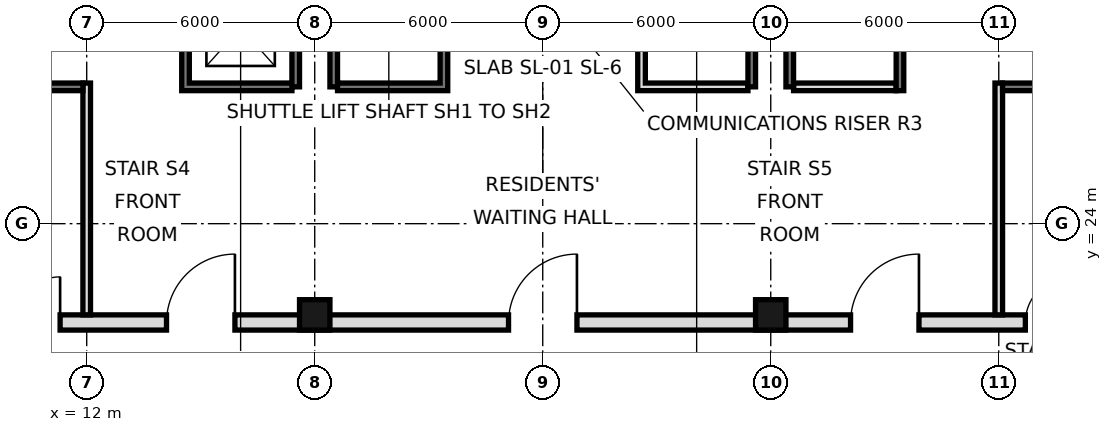
"""IFC4 building model, lengths in metres.
Left out: names, types, materials, properties, quantities, classifications, styles, units other than length and angle.
Written with IfcOpenShell. Run it as: python <this file> out.ifc"""

import sys

from ifc_helpers import new_model, si_unit, direction, frame, frame_2d, origin, origin_2d, place, context, subcontext, project, spatial, rectangle, hollow_rectangle, extrude, element, fill, save


model = new_model("IFC4")
c1 = context("Model", 3, precision=1e-05, world=origin(), true_north=direction((0.0, 1.0)))
c2 = subcontext(c1, "Body", "Model", "MODEL_VIEW")
j1 = project(units=[si_unit("LENGTHUNIT", "METRE"), si_unit("PLANEANGLEUNIT", "RADIAN")], contexts=[c1])
p1 = place(None, origin())
s1 = spatial("IfcSite", under=j1, at=p1, CompositionType="ELEMENT")
p2 = place(p1, origin())
s2 = spatial("IfcBuilding", under=s1, at=p2, CompositionType="ELEMENT")
p3 = place(p2, frame((0.0, 0.0, 44.4)))
s3 = spatial("IfcBuildingStorey", under=s2, at=p3, CompositionType="ELEMENT", Elevation=44.4)
for number, where, z_axis, x_axis in (
    (1, (18.0, 21.6, 0.0), (0.0, 0.0, 1.0), (1.0, 0.0, 0.0)),
    (2, (30.0, 21.6, 0.0), (0.0, 0.0, 1.0), (1.0, 0.0, 0.0)),
):
    element("IfcColumn", number, at=place(p3, frame(where, z_axis=z_axis, x_axis=x_axis)), inside=s3, PredefinedType="COLUMN", context=c2, shape_type="SweptSolid", body=[
        extrude(hollow_rectangle(XDim=0.8, YDim=0.8, WallThickness=0.07, at=origin_2d()), origin(), (0.0, 0.0, 1.0), 5.4),
    ])
for number, where, z_axis, x_axis in (
    (3, (17.5, 27.6, 0.0), (0.0, 0.0, 1.0), (0.0, 1.0, 0.0)),
    (4, (18.5, 27.6, 0.0), (0.0, 0.0, 1.0), (0.0, 1.0, 0.0)),
    (5, (29.5, 27.6, 0.0), (0.0, 0.0, 1.0), (0.0, 1.0, 0.0)),
    (6, (30.5, 27.6, 0.0), (0.0, 0.0, 1.0), (0.0, 1.0, 0.0)),
):
    element("IfcWall", number, at=place(p3, frame(where, z_axis=z_axis, x_axis=x_axis)), inside=s3, PredefinedType="SOLIDWALL", context=c2, shape_type="SweptSolid", body=[
        extrude(rectangle(XDim=17.5, YDim=0.2, at=frame_2d((8.75, 0.0))), origin(), (0.0, 0.0, 1.0), 5.22),
    ])
p4 = place(p3, frame((5.6, 21.4, 0.0), z_axis=(0.0, 0.0, 1.0), x_axis=(1.0, 0.0, 0.0)))
e7 = element("IfcWall", 7, at=p4, inside=s3, PredefinedType="SOLIDWALL", context=c2, shape_type="SweptSolid", body=[
    extrude(rectangle(XDim=36.8, YDim=0.4, at=frame_2d((18.4, 0.0))), origin(), (0.0, 0.0, 1.0), 5.22),
])
p5 = place(p4, frame((8.5, 0.0, 0.0)))
e8 = element("IfcOpeningElement", 8, at=p5, cuts=e7, PredefinedType="OPENING", context=c2, shape_type="SweptSolid", body=[
    extrude(rectangle(XDim=1.8, YDim=2.1, at=frame_2d((0.9, 1.05))), frame((0.0, 0.21, 0.0), z_axis=(0.0, -1.0, 0.0), x_axis=(1.0, 0.0, 0.0)), (0.0, 0.0, 1.0), 0.42),
])
p6 = place(p4, frame((17.5, 0.0, 0.0)))
e9 = element("IfcOpeningElement", 9, at=p6, cuts=e7, PredefinedType="OPENING", context=c2, shape_type="SweptSolid", body=[
    extrude(rectangle(XDim=1.8, YDim=2.1, at=frame_2d((0.9, 1.05))), frame((0.0, 0.21, 0.0), z_axis=(0.0, -1.0, 0.0), x_axis=(1.0, 0.0, 0.0)), (0.0, 0.0, 1.0), 0.42),
])
p7 = place(p4, frame((26.5, 0.0, 0.0)))
e10 = element("IfcOpeningElement", 10, at=p7, cuts=e7, PredefinedType="OPENING", context=c2, shape_type="SweptSolid", body=[
    extrude(rectangle(XDim=1.8, YDim=2.1, at=frame_2d((0.9, 1.05))), frame((0.0, 0.21, 0.0), z_axis=(0.0, -1.0, 0.0), x_axis=(1.0, 0.0, 0.0)), (0.0, 0.0, 1.0), 0.42),
])
p8 = place(p4, frame((4.5, 0.0, 0.0)))
e11 = element("IfcOpeningElement", 11, at=p8, cuts=e7, PredefinedType="OPENING", context=c2, shape_type="SweptSolid", body=[
    extrude(rectangle(XDim=1.2, YDim=2.1, at=frame_2d((0.6, 1.05))), frame((0.0, 0.21, 0.0), z_axis=(0.0, -1.0, 0.0), x_axis=(1.0, 0.0, 0.0)), (0.0, 0.0, 1.0), 0.42),
])
p9 = place(p4, frame((31.1, 0.0, 0.0)))
e12 = element("IfcOpeningElement", 12, at=p9, cuts=e7, PredefinedType="OPENING", context=c2, shape_type="SweptSolid", body=[
    extrude(rectangle(XDim=1.2, YDim=2.1, at=frame_2d((0.6, 1.05))), frame((0.0, 0.21, 0.0), z_axis=(0.0, -1.0, 0.0), x_axis=(1.0, 0.0, 0.0)), (0.0, 0.0, 1.0), 0.42),
])
p10 = place(p4, frame((1.163, 0.0, 0.0)))
e13 = element("IfcOpeningElement", 13, at=p10, cuts=e7, PredefinedType="OPENING", context=c2, shape_type="SweptSolid", body=[
    extrude(rectangle(XDim=0.9, YDim=2.1, at=frame_2d((0.45, 1.05))), frame((0.0, 0.21, 0.0), z_axis=(0.0, -1.0, 0.0), x_axis=(1.0, 0.0, 0.0)), (0.0, 0.0, 1.0), 0.42),
])
p11 = place(p4, frame((34.738, 0.0, 0.0)))
e14 = element("IfcOpeningElement", 14, at=p11, cuts=e7, PredefinedType="OPENING", context=c2, shape_type="SweptSolid", body=[
    extrude(rectangle(XDim=0.9, YDim=2.1, at=frame_2d((0.45, 1.05))), frame((0.0, 0.21, 0.0), z_axis=(0.0, -1.0, 0.0), x_axis=(1.0, 0.0, 0.0)), (0.0, 0.0, 1.0), 0.42),
])
p12 = place(p3, frame((12.0, 21.6, 0.0), z_axis=(0.0, 0.0, 1.0), x_axis=(0.0, 1.0, 0.0)))
e15 = element("IfcWall", 15, at=p12, inside=s3, PredefinedType="PARTITIONING", context=c2, shape_type="SweptSolid", body=[
    extrude(rectangle(XDim=6.1, YDim=0.2, at=frame_2d((3.05, 0.0))), origin(), (0.0, 0.0, 1.0), 5.22),
])
p13 = place(p3, frame((14.6, 27.5, 0.0), z_axis=(0.0, 0.0, 1.0), x_axis=(0.0, 1.0, 0.0)))
e16 = element("IfcWall", 16, at=p13, inside=s3, PredefinedType="SOLIDWALL", context=c2, shape_type="SweptSolid", body=[
    extrude(rectangle(XDim=17.5, YDim=0.2, at=frame_2d((8.75, 0.0))), origin(), (0.0, 0.0, 1.0), 5.22),
])
p14 = place(p13, frame((1.1, 0.0, 0.0)))
e17 = element("IfcOpeningElement", 17, at=p14, cuts=e16, PredefinedType="OPENING", context=c2, shape_type="SweptSolid", body=[
    extrude(rectangle(XDim=1.1, YDim=2.1, at=frame_2d((0.55, 1.05))), frame((0.0, 0.11, 0.0), z_axis=(0.0, -1.0, 0.0), x_axis=(1.0, 0.0, 0.0)), (0.0, 0.0, 1.0), 0.22),
])
p15 = place(p13, frame((4.2, 0.0, 0.0)))
e18 = element("IfcOpeningElement", 18, at=p15, cuts=e16, PredefinedType="OPENING", context=c2, shape_type="SweptSolid", body=[
    extrude(rectangle(XDim=1.1, YDim=2.1, at=frame_2d((0.55, 1.05))), frame((0.0, 0.11, 0.0), z_axis=(0.0, -1.0, 0.0), x_axis=(1.0, 0.0, 0.0)), (0.0, 0.0, 1.0), 0.22),
])
p16 = place(p13, frame((15.4, 0.0, 0.0)))
e19 = element("IfcOpeningElement", 19, at=p16, cuts=e16, PredefinedType="OPENING", context=c2, shape_type="SweptSolid", body=[
    extrude(rectangle(XDim=1.1, YDim=2.1, at=frame_2d((0.55, 1.05))), frame((0.0, 0.11, 0.0), z_axis=(0.0, -1.0, 0.0), x_axis=(1.0, 0.0, 0.0)), (0.0, 0.0, 1.0), 0.22),
])
p17 = place(p13, frame((9.9, 0.0, 0.0)))
e20 = element("IfcOpeningElement", 20, at=p17, cuts=e16, PredefinedType="OPENING", context=c2, shape_type="SweptSolid", body=[
    extrude(rectangle(XDim=0.9, YDim=2.1, at=frame_2d((0.45, 1.05))), frame((0.0, 0.11, 0.0), z_axis=(0.0, -1.0, 0.0), x_axis=(1.0, 0.0, 0.0)), (0.0, 0.0, 1.0), 0.22),
])
p18 = place(p3, frame((21.4, 27.5, 0.0), z_axis=(0.0, 0.0, 1.0), x_axis=(0.0, 1.0, 0.0)))
e21 = element("IfcWall", 21, at=p18, inside=s3, PredefinedType="SOLIDWALL", context=c2, shape_type="SweptSolid", body=[
    extrude(rectangle(XDim=17.5, YDim=0.2, at=frame_2d((8.75, 0.0))), origin(), (0.0, 0.0, 1.0), 5.22),
])
p19 = place(p18, frame((16.2, 0.0, 0.0)))
e22 = element("IfcOpeningElement", 22, at=p19, cuts=e21, PredefinedType="OPENING", context=c2, shape_type="SweptSolid", body=[
    extrude(rectangle(XDim=1.0, YDim=2.1, at=frame_2d((0.5, 1.05))), frame((0.0, 0.11, 0.0), z_axis=(0.0, -1.0, 0.0), x_axis=(1.0, 0.0, 0.0)), (0.0, 0.0, 1.0), 0.22),
])
p20 = place(p18, frame((9.8, 0.0, 0.0)))
e23 = element("IfcOpeningElement", 23, at=p20, cuts=e21, PredefinedType="OPENING", context=c2, shape_type="SweptSolid", body=[
    extrude(rectangle(XDim=1.0, YDim=2.1, at=frame_2d((0.5, 1.05))), frame((0.0, 0.11, 0.0), z_axis=(0.0, -1.0, 0.0), x_axis=(1.0, 0.0, 0.0)), (0.0, 0.0, 1.0), 0.22),
])
p21 = place(p18, frame((7.4, 0.0, 0.0)))
e24 = element("IfcOpeningElement", 24, at=p21, cuts=e21, PredefinedType="OPENING", context=c2, shape_type="SweptSolid", body=[
    extrude(rectangle(XDim=0.9, YDim=2.1, at=frame_2d((0.45, 1.05))), frame((0.0, 0.11, 0.0), z_axis=(0.0, -1.0, 0.0), x_axis=(1.0, 0.0, 0.0)), (0.0, 0.0, 1.0), 0.22),
])
p22 = place(p3, frame((26.6, 27.5, 0.0), z_axis=(0.0, 0.0, 1.0), x_axis=(0.0, 1.0, 0.0)))
e25 = element("IfcWall", 25, at=p22, inside=s3, PredefinedType="SOLIDWALL", context=c2, shape_type="SweptSolid", body=[
    extrude(rectangle(XDim=17.5, YDim=0.2, at=frame_2d((8.75, 0.0))), origin(), (0.0, 0.0, 1.0), 5.22),
])
p23 = place(p22, frame((4.3, 0.0, 0.0)))
e26 = element("IfcOpeningElement", 26, at=p23, cuts=e25, PredefinedType="OPENING", context=c2, shape_type="SweptSolid", body=[
    extrude(rectangle(XDim=0.9, YDim=2.1, at=frame_2d((0.45, 1.05))), frame((0.0, 0.11, 0.0), z_axis=(0.0, -1.0, 0.0), x_axis=(1.0, 0.0, 0.0)), (0.0, 0.0, 1.0), 0.22),
])
p24 = place(p22, frame((10.35, 0.0, 0.0)))
e27 = element("IfcOpeningElement", 27, at=p24, cuts=e25, PredefinedType="OPENING", context=c2, shape_type="SweptSolid", body=[
    extrude(rectangle(XDim=1.0, YDim=2.1, at=frame_2d((0.5, 1.05))), frame((0.0, 0.11, 0.0), z_axis=(0.0, -1.0, 0.0), x_axis=(1.0, 0.0, 0.0)), (0.0, 0.0, 1.0), 0.22),
])
p25 = place(p22, frame((14.575, 0.0, 0.0)))
e28 = element("IfcOpeningElement", 28, at=p25, cuts=e25, PredefinedType="OPENING", context=c2, shape_type="SweptSolid", body=[
    extrude(rectangle(XDim=1.0, YDim=2.1, at=frame_2d((0.5, 1.05))), frame((0.0, 0.11, 0.0), z_axis=(0.0, -1.0, 0.0), x_axis=(1.0, 0.0, 0.0)), (0.0, 0.0, 1.0), 0.22),
])
p26 = place(p3, frame((33.4, 27.5, 0.0), z_axis=(0.0, 0.0, 1.0), x_axis=(0.0, 1.0, 0.0)))
e29 = element("IfcWall", 29, at=p26, inside=s3, PredefinedType="SOLIDWALL", context=c2, shape_type="SweptSolid", body=[
    extrude(rectangle(XDim=17.5, YDim=0.2, at=frame_2d((8.75, 0.0))), origin(), (0.0, 0.0, 1.0), 5.22),
])
p27 = place(p26, frame((15.4, 0.0, 0.0)))
e30 = element("IfcOpeningElement", 30, at=p27, cuts=e29, PredefinedType="OPENING", context=c2, shape_type="SweptSolid", body=[
    extrude(rectangle(XDim=1.1, YDim=2.1, at=frame_2d((0.55, 1.05))), frame((0.0, 0.11, 0.0), z_axis=(0.0, -1.0, 0.0), x_axis=(1.0, 0.0, 0.0)), (0.0, 0.0, 1.0), 0.22),
])
p28 = place(p26, frame((2.7, 0.0, 0.0)))
e31 = element("IfcOpeningElement", 31, at=p28, cuts=e29, PredefinedType="OPENING", context=c2, shape_type="SweptSolid", body=[
    extrude(rectangle(XDim=1.0, YDim=2.1, at=frame_2d((0.5, 1.05))), frame((0.0, 0.11, 0.0), z_axis=(0.0, -1.0, 0.0), x_axis=(1.0, 0.0, 0.0)), (0.0, 0.0, 1.0), 0.22),
])
p29 = place(p26, frame((9.9, 0.0, 0.0)))
e32 = element("IfcOpeningElement", 32, at=p29, cuts=e29, PredefinedType="OPENING", context=c2, shape_type="SweptSolid", body=[
    extrude(rectangle(XDim=0.9, YDim=2.1, at=frame_2d((0.45, 1.05))), frame((0.0, 0.11, 0.0), z_axis=(0.0, -1.0, 0.0), x_axis=(1.0, 0.0, 0.0)), (0.0, 0.0, 1.0), 0.22),
])
p30 = place(p3, frame((36.0, 21.6, 0.0), z_axis=(0.0, 0.0, 1.0), x_axis=(0.0, 1.0, 0.0)))
e33 = element("IfcWall", 33, at=p30, inside=s3, PredefinedType="PARTITIONING", context=c2, shape_type="SweptSolid", body=[
    extrude(rectangle(XDim=6.1, YDim=0.2, at=frame_2d((3.05, 0.0))), origin(), (0.0, 0.0, 1.0), 5.22),
])
for number, where, z_axis, x_axis in (
    (34, (14.7, 27.6, 0.0), (0.0, 0.0, 1.0), (1.0, 0.0, 0.0)),
    (35, (18.6, 27.6, 0.0), (0.0, 0.0, 1.0), (1.0, 0.0, 0.0)),
    (36, (26.7, 27.6, 0.0), (0.0, 0.0, 1.0), (1.0, 0.0, 0.0)),
):
    element("IfcWall", number, at=place(p3, frame(where, z_axis=z_axis, x_axis=x_axis)), inside=s3, PredefinedType="SOLIDWALL", context=c2, shape_type="SweptSolid", body=[
        extrude(rectangle(XDim=2.7, YDim=0.2, at=frame_2d((1.35, 0.0))), origin(), (0.0, 0.0, 1.0), 5.22),
    ])
p31 = place(p3, frame((30.6, 27.6, 0.0), z_axis=(0.0, 0.0, 1.0), x_axis=(1.0, 0.0, 0.0)))
e37 = element("IfcWall", 37, at=p31, inside=s3, PredefinedType="PARTITIONING", context=c2, shape_type="SweptSolid", body=[
    extrude(rectangle(XDim=2.7, YDim=0.2, at=frame_2d((1.35, 0.0))), origin(), (0.0, 0.0, 1.0), 5.22),
])
for number, where, z_axis, x_axis in (
    (38, (36.1, 27.6, 0.0), (0.0, 0.0, 1.0), (1.0, 0.0, 0.0)),
    (39, (6.6, 27.6, 0.0), (0.0, 0.0, 1.0), (1.0, 0.0, 0.0)),
):
    element("IfcWall", number, at=place(p3, frame(where, z_axis=z_axis, x_axis=x_axis)), inside=s3, PredefinedType="SOLIDWALL", context=c2, shape_type="SweptSolid", body=[
        extrude(rectangle(XDim=5.3, YDim=0.2, at=frame_2d((2.65, 0.0))), origin(), (0.0, 0.0, 1.0), 5.22),
    ])
p32 = place(p5, frame((1.8, 0.0, 0.0), z_axis=(0.0, 0.0, 1.0), x_axis=(-1.0, 0.0, 0.0)))
e40 = element("IfcDoor", 40, at=p32, inside=s3, OperationType="SINGLE_SWING_LEFT", PredefinedType="DOOR", context=c2, shape_type="SweptSolid", body=[
    extrude(rectangle(XDim=1.8, YDim=2.1, at=frame_2d((0.9, 1.05))), frame((0.0, 0.025, 0.0), z_axis=(0.0, -1.0, 0.0), x_axis=(1.0, 0.0, 0.0)), (0.0, 0.0, 1.0), 0.05),
])
fill(e8, e40)
p33 = place(p6, frame((1.8, 0.0, 0.0), z_axis=(0.0, 0.0, 1.0), x_axis=(-1.0, 0.0, 0.0)))
e41 = element("IfcDoor", 41, at=p33, inside=s3, OperationType="SINGLE_SWING_LEFT", PredefinedType="DOOR", context=c2, shape_type="SweptSolid", body=[
    extrude(rectangle(XDim=1.8, YDim=2.1, at=frame_2d((0.9, 1.05))), frame((0.0, 0.025, 0.0), z_axis=(0.0, -1.0, 0.0), x_axis=(1.0, 0.0, 0.0)), (0.0, 0.0, 1.0), 0.05),
])
fill(e9, e41)
p34 = place(p7, frame((1.8, 0.0, 0.0), z_axis=(0.0, 0.0, 1.0), x_axis=(-1.0, 0.0, 0.0)))
e42 = element("IfcDoor", 42, at=p34, inside=s3, OperationType="SINGLE_SWING_LEFT", PredefinedType="DOOR", context=c2, shape_type="SweptSolid", body=[
    extrude(rectangle(XDim=1.8, YDim=2.1, at=frame_2d((0.9, 1.05))), frame((0.0, 0.025, 0.0), z_axis=(0.0, -1.0, 0.0), x_axis=(1.0, 0.0, 0.0)), (0.0, 0.0, 1.0), 0.05),
])
fill(e10, e42)
p35 = place(p8, frame((1.2, 0.0, 0.0), z_axis=(0.0, 0.0, 1.0), x_axis=(-1.0, 0.0, 0.0)))
e43 = element("IfcDoor", 43, at=p35, inside=s3, OperationType="SINGLE_SWING_LEFT", PredefinedType="DOOR", context=c2, shape_type="SweptSolid", body=[
    extrude(rectangle(XDim=1.2, YDim=2.1, at=frame_2d((0.6, 1.05))), frame((0.0, 0.025, 0.0), z_axis=(0.0, -1.0, 0.0), x_axis=(1.0, 0.0, 0.0)), (0.0, 0.0, 1.0), 0.05),
])
fill(e11, e43)
p36 = place(p9, frame((1.2, 0.0, 0.0), z_axis=(0.0, 0.0, 1.0), x_axis=(-1.0, 0.0, 0.0)))
e44 = element("IfcDoor", 44, at=p36, inside=s3, OperationType="SINGLE_SWING_LEFT", PredefinedType="DOOR", context=c2, shape_type="SweptSolid", body=[
    extrude(rectangle(XDim=1.2, YDim=2.1, at=frame_2d((0.6, 1.05))), frame((0.0, 0.025, 0.0), z_axis=(0.0, -1.0, 0.0), x_axis=(1.0, 0.0, 0.0)), (0.0, 0.0, 1.0), 0.05),
])
fill(e12, e44)
save(model, sys.argv[1])
